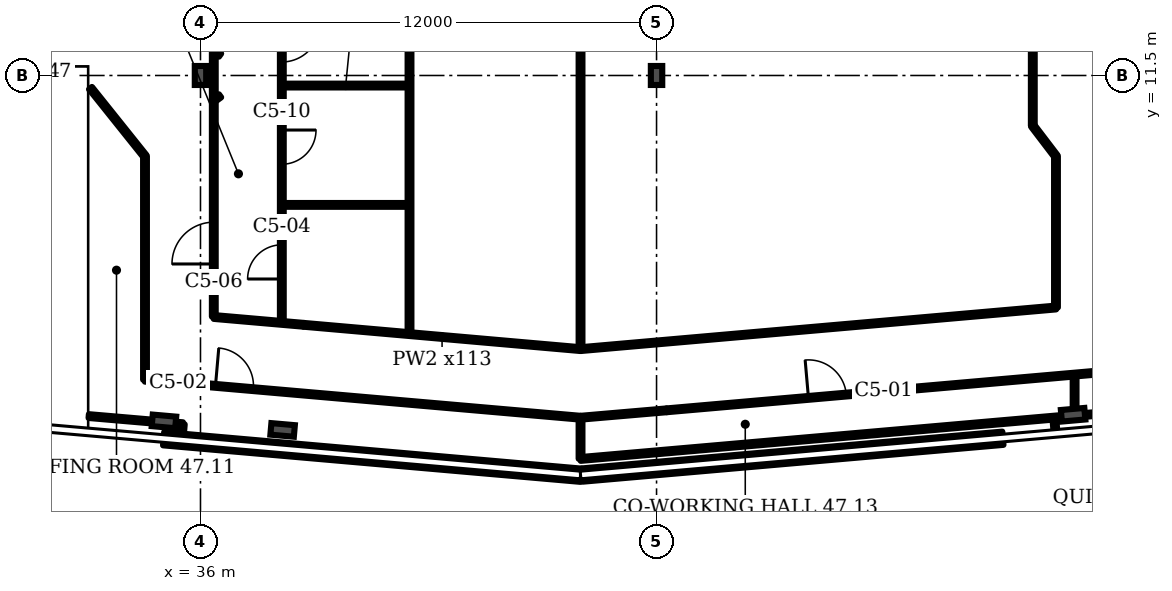
"""IFC4 building model, lengths in metres.
Left out: names, types, materials, properties, quantities, classifications, styles, units other than length and angle.
Written with IfcOpenShell. Run it as: python <this file> out.ifc"""

import sys

from ifc_helpers import new_model, si_unit, direction, frame, frame_2d, origin, origin_2d, place, context, subcontext, project, spatial, rectangle, i_section, extrude, element, fill, save


model = new_model("IFC4")
c1 = context("Model", 3, precision=1e-05, world=origin(), true_north=direction((0.0, 1.0)))
c2 = subcontext(c1, "Body", "Model", "MODEL_VIEW")
j1 = project(units=[si_unit("LENGTHUNIT", "METRE"), si_unit("PLANEANGLEUNIT", "RADIAN")], contexts=[c1])
p1 = place(None, origin())
s1 = spatial("IfcSite", under=j1, at=p1, CompositionType="ELEMENT")
p2 = place(p1, origin())
s2 = spatial("IfcBuilding", under=s1, at=p2, CompositionType="ELEMENT")
p3 = place(p2, frame((0.0, 0.0, 191.5)))
s3 = spatial("IfcBuildingStorey", under=s2, at=p3, CompositionType="ELEMENT", Elevation=191.5)
for number, where, z_axis, x_axis in (
    (1, (35.039, 2.399, 0.0), (0.0, 0.0, 1.0), (-0.087, -0.996, 0.0)),
    (2, (38.161, 2.174, 0.0), (0.0, 0.0, 1.0), (-0.087, -0.996, 0.0)),
    (3, (58.961, 2.573, 0.0), (0.0, 0.0, 1.0), (0.087, -0.996, 0.0)),
):
    element("IfcColumn", number, at=place(p3, frame(where, z_axis=z_axis, x_axis=x_axis)), inside=s3, PredefinedType="COLUMN", context=c2, shape_type="SweptSolid", body=[
        extrude(i_section(OverallWidth=0.305, OverallDepth=0.62, WebThickness=0.021, FlangeThickness=0.04, FilletRadius=0.027, at=origin_2d()), origin(), (0.0, 0.0, 1.0), 3.6),
    ])
for number, where, z_axis, x_axis in (
    (4, (36.0, 11.5, 0.0), (0.0, 0.0, 1.0), (1.0, 0.0, 0.0)),
    (5, (48.0, 11.5, 0.0), (0.0, 0.0, 1.0), (1.0, 0.0, 0.0)),
):
    element("IfcColumn", number, at=place(p3, frame(where, z_axis=z_axis, x_axis=x_axis)), inside=s3, PredefinedType="COLUMN", context=c2, shape_type="SweptSolid", body=[
        extrude(i_section(OverallWidth=0.3, OverallDepth=0.5, WebThickness=0.014, FlangeThickness=0.028, FilletRadius=0.027, at=origin_2d()), origin(), (0.0, 0.0, 1.0), 3.6),
    ])
p4 = place(p3, frame((35.03, 1.943, 0.0), z_axis=(0.0, 0.0, 1.0), x_axis=(0.996199, -0.08714, 0.0)))
e6 = element("IfcWall", 6, at=p4, inside=s3, PredefinedType="SOLIDWALL", context=c2, shape_type="SweptSolid", body=[
    extrude(rectangle(XDim=11.028, YDim=0.35, at=frame_2d((5.514, 0.0))), origin(), (0.0, 0.0, 1.0), 1.0),
])
p5 = place(p3, frame((46.045, 0.987, 0.0), z_axis=(0.0, 0.0, 1.0), x_axis=(0.996193, 0.087171, 0.0)))
e7 = element("IfcWall", 7, at=p5, inside=s3, PredefinedType="SOLIDWALL", context=c2, shape_type="SweptSolid", body=[
    extrude(rectangle(XDim=11.11, YDim=0.35, at=frame_2d((5.555, 0.0))), origin(), (0.0, 0.0, 1.0), 1.0),
])
p6 = place(p3, frame((34.54, 3.495, 0.0), z_axis=(0.0, 0.0, 1.0), x_axis=(0.0, 1.0, 0.0)))
e8 = element("IfcWall", 8, at=p6, inside=s3, PredefinedType="PARTITIONING", context=c2, shape_type="SweptSolid", body=[
    extrude(rectangle(XDim=5.88, YDim=0.1, at=frame_2d((2.94, 0.0))), origin(), (0.0, 0.0, 1.0), 3.2),
])
p7 = place(p3, frame((34.54, 9.375, 0.0), z_axis=(0.0, 0.0, 1.0), x_axis=(-0.624735, 0.780839, 0.0)))
e9 = element("IfcWall", 9, at=p7, inside=s3, PredefinedType="PARTITIONING", context=c2, shape_type="SweptSolid", body=[
    extrude(rectangle(XDim=2.296, YDim=0.1, at=frame_2d((1.148, 0.0))), origin(), (0.0, 0.0, 1.0), 3.2),
])
p8 = place(p3, frame((35.502, 1.927, 0.0), z_axis=(0.0, 0.0, 1.0), x_axis=(0.083045, 0.996542, 0.0)))
e10 = element("IfcWall", 10, at=p8, inside=s3, PredefinedType="PARTITIONING", context=c2, shape_type="SweptSolid", body=[
    extrude(rectangle(XDim=0.4, YDim=0.1, at=frame_2d((0.2, 0.0))), origin(), (0.0, 0.0, 1.0), 3.2),
])
p9 = place(p3, frame((35.535, 2.325, 0.0), z_axis=(0.0, 0.0, 1.0), x_axis=(-0.996311, 0.085867, 0.0)))
e11 = element("IfcWall", 11, at=p9, inside=s3, PredefinedType="PARTITIONING", context=c2, shape_type="SweptSolid", body=[
    extrude(rectangle(XDim=2.485, YDim=0.1, at=frame_2d((1.243, 0.0))), origin(), (0.0, 0.0, 1.0), 2.58),
])
p10 = place(p3, frame((36.35, 5.155, 0.0), z_axis=(0.0, 0.0, 1.0), x_axis=(0.0, 1.0, 0.0)))
e12 = element("IfcWall", 12, at=p10, inside=s3, PredefinedType="PARTITIONING", context=c2, shape_type="SweptSolid", body=[
    extrude(rectangle(XDim=9.88, YDim=0.1, at=frame_2d((4.94, 0.0))), origin(), (0.0, 0.0, 1.0), 3.2),
])
p11 = place(p10, frame((1.385, 0.0, 0.0)))
e13 = element("IfcOpeningElement", 13, at=p11, cuts=e12, PredefinedType="OPENING", context=c2, shape_type="SweptSolid", body=[
    extrude(rectangle(XDim=1.1, YDim=2.1, at=frame_2d((0.55, 1.05))), frame((0.0, 0.06, 0.0), z_axis=(0.0, -1.0, 0.0), x_axis=(1.0, 0.0, 0.0)), (0.0, 0.0, 1.0), 0.12),
])
for number, where, z_axis, x_axis in (
    (14, (36.35, 10.845, 0.0), (0.0, 0.0, 1.0), (0.808, 0.589, 0.0)),
    (15, (36.515, 12.035, 0.0), (0.0, 0.0, 1.0), (-0.808, 0.589, 0.0)),
):
    element("IfcWall", number, at=place(p3, frame(where, z_axis=z_axis, x_axis=x_axis)), inside=s3, PredefinedType="PARTITIONING", context=c2, shape_type="SweptSolid", body=[
        extrude(rectangle(XDim=0.204, YDim=0.1, at=frame_2d((0.102, 0.0))), origin(), (0.0, 0.0, 1.0), 3.2),
    ])
p12 = place(p3, frame((38.14, 5.0, 0.0), z_axis=(0.0, 0.0, 1.0), x_axis=(0.0, 1.0, 0.0)))
e16 = element("IfcWall", 16, at=p12, inside=s3, PredefinedType="PARTITIONING", context=c2, shape_type="SweptSolid", body=[
    extrude(rectangle(XDim=8.3, YDim=0.1, at=frame_2d((4.15, 0.0))), origin(), (0.0, 0.0, 1.0), 3.2),
])
p13 = place(p12, frame((1.145, 0.0, 0.0)))
e17 = element("IfcOpeningElement", 17, at=p13, cuts=e16, PredefinedType="OPENING", context=c2, shape_type="SweptSolid", body=[
    extrude(rectangle(XDim=0.9, YDim=2.1, at=frame_2d((0.45, 1.05))), frame((0.0, 0.06, 0.0), z_axis=(0.0, -1.0, 0.0), x_axis=(1.0, 0.0, 0.0)), (0.0, 0.0, 1.0), 0.12),
])
p14 = place(p12, frame((4.165, 0.0, 0.0)))
e18 = element("IfcOpeningElement", 18, at=p14, cuts=e16, PredefinedType="OPENING", context=c2, shape_type="SweptSolid", body=[
    extrude(rectangle(XDim=0.9, YDim=2.1, at=frame_2d((0.45, 1.05))), frame((0.0, 0.06, 0.0), z_axis=(0.0, -1.0, 0.0), x_axis=(1.0, 0.0, 0.0)), (0.0, 0.0, 1.0), 0.12),
])
p15 = place(p12, frame((6.855, 0.0, 0.0)))
e19 = element("IfcOpeningElement", 19, at=p15, cuts=e16, PredefinedType="OPENING", context=c2, shape_type="SweptSolid", body=[
    extrude(rectangle(XDim=1.0, YDim=2.1, at=frame_2d((0.5, 1.05))), frame((0.0, 0.06, 0.0), z_axis=(0.0, -1.0, 0.0), x_axis=(1.0, 0.0, 0.0)), (0.0, 0.0, 1.0), 0.12),
])
for number, where, z_axis, x_axis in (
    (20, (38.14, 8.095, 0.0), (0.0, 0.0, 1.0), (1.0, 0.0, 0.0)),
    (21, (38.14, 11.235, 0.0), (0.0, 0.0, 1.0), (1.0, 0.0, 0.0)),
):
    element("IfcWall", number, at=place(p3, frame(where, z_axis=z_axis, x_axis=x_axis)), inside=s3, PredefinedType="PARTITIONING", context=c2, shape_type="SweptSolid", body=[
        extrude(rectangle(XDim=3.36, YDim=0.1, at=frame_2d((1.68, 0.0))), origin(), (0.0, 0.0, 1.0), 3.2),
    ])
p16 = place(p3, frame((38.715, 4.94, 0.0), z_axis=(0.0, 0.0, 1.0), x_axis=(-0.996236, 0.086674, 0.0)))
e22 = element("IfcWall", 22, at=p16, inside=s3, PredefinedType="PARTITIONING", context=c2, shape_type="SweptSolid", body=[
    extrude(rectangle(XDim=2.372, YDim=0.1, at=frame_2d((1.186, 0.0))), origin(), (0.0, 0.0, 1.0), 3.2),
])
p17 = place(p3, frame((41.5, 4.695, 0.0), z_axis=(0.0, 0.0, 1.0), x_axis=(0.0, 1.0, 0.0)))
e23 = element("IfcWall", 23, at=p17, inside=s3, PredefinedType="PARTITIONING", context=c2, shape_type="SweptSolid", body=[
    extrude(rectangle(XDim=8.605, YDim=0.1, at=frame_2d((4.302, 0.0))), origin(), (0.0, 0.0, 1.0), 3.2),
])
p18 = place(p3, frame((46.0, 4.3, 0.0), z_axis=(0.0, 0.0, 1.0), x_axis=(-0.996173, 0.087448, 0.0)))
e24 = element("IfcWall", 24, at=p18, inside=s3, PredefinedType="PARTITIONING", context=c2, shape_type="SweptSolid", body=[
    extrude(rectangle(XDim=7.315, YDim=0.1, at=frame_2d((3.657, 0.0))), origin(), (0.0, 0.0, 1.0), 3.2),
])
p19 = place(p3, frame((46.0, 1.41, 0.0), z_axis=(0.0, 0.0, 1.0), x_axis=(0.996213, 0.086958, 0.0)))
e25 = element("IfcWall", 25, at=p19, inside=s3, PredefinedType="PARTITIONING", context=c2, shape_type="SweptSolid", body=[
    extrude(rectangle(XDim=15.852, YDim=0.1, at=frame_2d((7.926, 0.0))), origin(), (0.0, 0.0, 1.0), 2.58),
])
p20 = place(p3, frame((46.0, 1.415, 0.0), z_axis=(0.0, 0.0, 1.0), x_axis=(0.0, 1.0, 0.0)))
e26 = element("IfcWall", 26, at=p20, inside=s3, PredefinedType="PARTITIONING", context=c2, shape_type="SweptSolid", body=[
    extrude(rectangle(XDim=1.08, YDim=0.1, at=frame_2d((0.54, 0.0))), origin(), (0.0, 0.0, 1.0), 3.2),
])
p21 = place(p3, frame((46.0, 2.495, 0.0), z_axis=(0.0, 0.0, 1.0), x_axis=(-0.996214, 0.08693, 0.0)))
e27 = element("IfcWall", 27, at=p21, inside=s3, PredefinedType="PARTITIONING", context=c2, shape_type="SweptSolid", body=[
    extrude(rectangle(XDim=11.503, YDim=0.1, at=frame_2d((5.752, 0.0))), origin(), (0.0, 0.0, 1.0), 3.2),
])
p22 = place(p21, frame((8.642, 0.0, 0.0)))
e28 = element("IfcOpeningElement", 28, at=p22, cuts=e27, PredefinedType="OPENING", context=c2, shape_type="SweptSolid", body=[
    extrude(rectangle(XDim=1.0, YDim=2.1, at=frame_2d((0.5, 1.05))), frame((0.0, 0.06, 0.0), z_axis=(0.0, -1.0, 0.0), x_axis=(1.0, 0.0, 0.0)), (0.0, 0.0, 1.0), 0.12),
])
p23 = place(p3, frame((46.0, 4.3, 0.0), z_axis=(0.0, 0.0, 1.0), x_axis=(0.0, 1.0, 0.0)))
e29 = element("IfcWall", 29, at=p23, inside=s3, PredefinedType="PARTITIONING", context=c2, shape_type="SweptSolid", body=[
    extrude(rectangle(XDim=22.9, YDim=0.1, at=frame_2d((11.45, 0.0))), origin(), (0.0, 0.0, 1.0), 3.2),
])
p24 = place(p3, frame((46.0, 2.495, 0.0), z_axis=(0.0, 0.0, 1.0), x_axis=(0.996324, 0.085703, 0.0)))
e30 = element("IfcWall", 30, at=p24, inside=s3, PredefinedType="PARTITIONING", context=c2, shape_type="SweptSolid", body=[
    extrude(rectangle(XDim=2.273, YDim=0.1, at=frame_2d((1.137, 0.0))), origin(), (0.0, 0.0, 1.0), 3.2),
])
p25 = place(p3, frame((46.0, 4.3, 0.0), z_axis=(0.0, 0.0, 1.0), x_axis=(0.996189, 0.087194, 0.0)))
e31 = element("IfcWall", 31, at=p25, inside=s3, PredefinedType="PARTITIONING", context=c2, shape_type="SweptSolid", body=[
    extrude(rectangle(XDim=12.558, YDim=0.1, at=frame_2d((6.279, 0.0))), origin(), (0.0, 0.0, 1.0), 3.2),
])
p26 = place(p3, frame((48.265, 2.69, 0.0), z_axis=(0.0, 0.0, 1.0), x_axis=(0.996187, 0.087229, 0.0)))
e32 = element("IfcWall", 32, at=p26, inside=s3, PredefinedType="PARTITIONING", context=c2, shape_type="SweptSolid", body=[
    extrude(rectangle(XDim=12.091, YDim=0.1, at=frame_2d((6.045, 0.0))), origin(), (0.0, 0.0, 1.0), 3.2),
])
p27 = place(p26, frame((3.747, 0.0, 0.0)))
e33 = element("IfcOpeningElement", 33, at=p27, cuts=e32, PredefinedType="OPENING", context=c2, shape_type="SweptSolid", body=[
    extrude(rectangle(XDim=1.0, YDim=2.1, at=frame_2d((0.5, 1.05))), frame((0.0, 0.06, 0.0), z_axis=(0.0, -1.0, 0.0), x_axis=(1.0, 0.0, 0.0)), (0.0, 0.0, 1.0), 0.12),
])
p28 = place(p3, frame((57.9, 10.175, 0.0), z_axis=(0.0, 0.0, 1.0), x_axis=(0.0, 1.0, 0.0)))
e34 = element("IfcWall", 34, at=p28, inside=s3, PredefinedType="PARTITIONING", context=c2, shape_type="SweptSolid", body=[
    extrude(rectangle(XDim=2.65, YDim=0.1, at=frame_2d((1.325, 0.0))), origin(), (0.0, 0.0, 1.0), 3.2),
])
p29 = place(p3, frame((58.498, 2.102, 0.0), z_axis=(0.0, 0.0, 1.0), x_axis=(-0.083045, 0.996542, 0.0)))
e35 = element("IfcWall", 35, at=p29, inside=s3, PredefinedType="PARTITIONING", context=c2, shape_type="SweptSolid", body=[
    extrude(rectangle(XDim=0.4, YDim=0.1, at=frame_2d((0.2, 0.0))), origin(), (0.0, 0.0, 1.0), 3.2),
])
p30 = place(p3, frame((58.51, 9.375, 0.0), z_axis=(0.0, 0.0, 1.0), x_axis=(-0.60639, 0.795174, 0.0)))
e36 = element("IfcWall", 36, at=p30, inside=s3, PredefinedType="PARTITIONING", context=c2, shape_type="SweptSolid", body=[
    extrude(rectangle(XDim=1.006, YDim=0.1, at=frame_2d((0.503, 0.0))), origin(), (0.0, 0.0, 1.0), 3.2),
])
p31 = place(p3, frame((58.51, 5.395, 0.0), z_axis=(0.0, 0.0, 1.0), x_axis=(0.0, 1.0, 0.0)))
e37 = element("IfcWall", 37, at=p31, inside=s3, PredefinedType="PARTITIONING", context=c2, shape_type="SweptSolid", body=[
    extrude(rectangle(XDim=3.98, YDim=0.1, at=frame_2d((1.99, 0.0))), origin(), (0.0, 0.0, 1.0), 3.2),
])
p32 = place(p3, frame((59.0, 2.545, 0.0), z_axis=(0.0, 0.0, 1.0), x_axis=(0.0, 1.0, 0.0)))
e38 = element("IfcWall", 38, at=p32, inside=s3, PredefinedType="PARTITIONING", context=c2, shape_type="SweptSolid", body=[
    extrude(rectangle(XDim=1.085, YDim=0.1, at=frame_2d((0.542, 0.0))), origin(), (0.0, 0.0, 1.0), 3.2),
])
p33 = place(p27, origin())
e39 = element("IfcDoor", 39, at=p33, inside=s3, OperationType="SINGLE_SWING_LEFT", PredefinedType="DOOR", context=c2, shape_type="SweptSolid", body=[
    extrude(rectangle(XDim=1.0, YDim=2.1, at=frame_2d((0.5, 1.05))), frame((0.0, 0.025, 0.0), z_axis=(0.0, -1.0, 0.0), x_axis=(1.0, 0.0, 0.0)), (0.0, 0.0, 1.0), 0.05),
])
fill(e33, e39)
p34 = place(p22, origin())
e40 = element("IfcDoor", 40, at=p34, inside=s3, OperationType="SINGLE_SWING_RIGHT", PredefinedType="DOOR", context=c2, shape_type="SweptSolid", body=[
    extrude(rectangle(XDim=1.0, YDim=2.1, at=frame_2d((0.5, 1.05))), frame((0.0, 0.025, 0.0), z_axis=(0.0, -1.0, 0.0), x_axis=(1.0, 0.0, 0.0)), (0.0, 0.0, 1.0), 0.05),
])
fill(e28, e40)
p35 = place(p13, origin())
e41 = element("IfcDoor", 41, at=p35, inside=s3, OperationType="SINGLE_SWING_LEFT", PredefinedType="DOOR", context=c2, shape_type="SweptSolid", body=[
    extrude(rectangle(XDim=0.9, YDim=2.1, at=frame_2d((0.45, 1.05))), frame((0.0, 0.025, 0.0), z_axis=(0.0, -1.0, 0.0), x_axis=(1.0, 0.0, 0.0)), (0.0, 0.0, 1.0), 0.05),
])
fill(e17, e41)
p36 = place(p11, origin())
e42 = element("IfcDoor", 42, at=p36, inside=s3, OperationType="SINGLE_SWING_LEFT", PredefinedType="DOOR", context=c2, shape_type="SweptSolid", body=[
    extrude(rectangle(XDim=1.1, YDim=2.1, at=frame_2d((0.55, 1.05))), frame((0.0, 0.025, 0.0), z_axis=(0.0, -1.0, 0.0), x_axis=(1.0, 0.0, 0.0)), (0.0, 0.0, 1.0), 0.05),
])
fill(e13, e42)
p37 = place(p14, origin())
e43 = element("IfcDoor", 43, at=p37, inside=s3, OperationType="SINGLE_SWING_RIGHT", PredefinedType="DOOR", context=c2, shape_type="SweptSolid", body=[
    extrude(rectangle(XDim=0.9, YDim=2.1, at=frame_2d((0.45, 1.05))), frame((0.0, 0.025, 0.0), z_axis=(0.0, -1.0, 0.0), x_axis=(1.0, 0.0, 0.0)), (0.0, 0.0, 1.0), 0.05),
])
fill(e18, e43)
p38 = place(p15, origin())
e44 = element("IfcDoor", 44, at=p38, inside=s3, OperationType="SINGLE_SWING_RIGHT", PredefinedType="DOOR", context=c2, shape_type="SweptSolid", body=[
    extrude(rectangle(XDim=1.0, YDim=2.1, at=frame_2d((0.5, 1.05))), frame((0.0, 0.025, 0.0), z_axis=(0.0, -1.0, 0.0), x_axis=(1.0, 0.0, 0.0)), (0.0, 0.0, 1.0), 0.05),
])
fill(e19, e44)
save(model, sys.argv[1])
